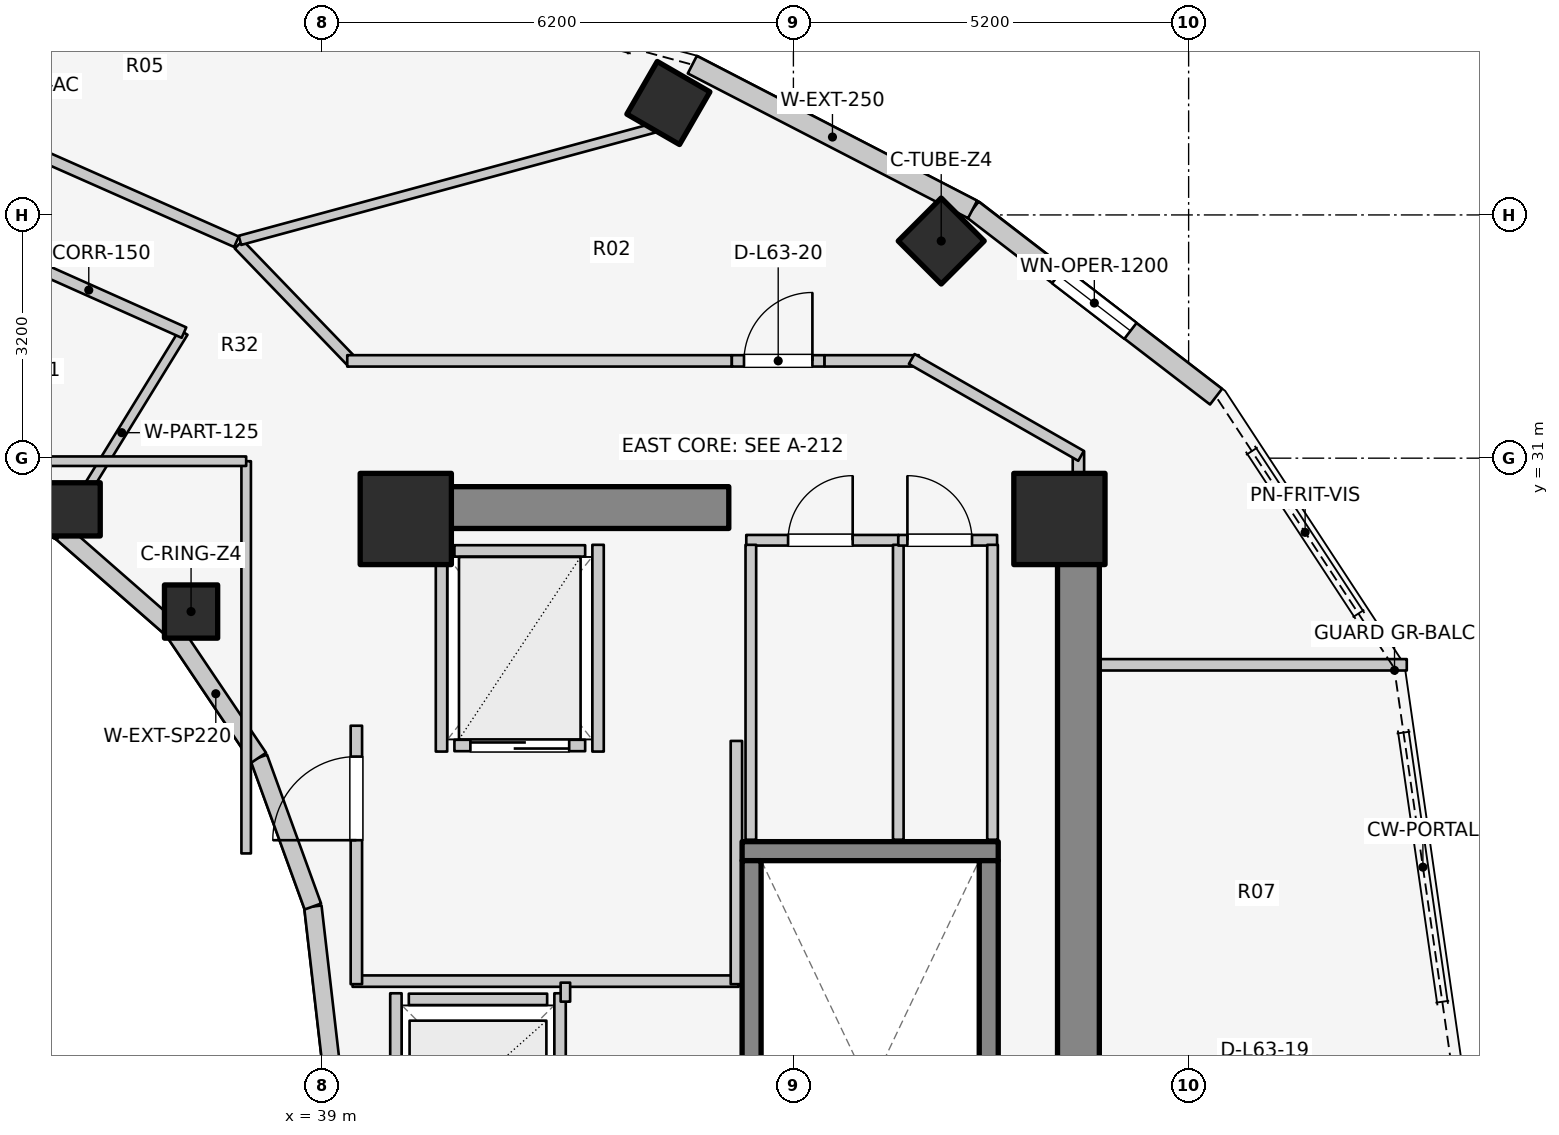
"""IFC4 building model, lengths in metres.
Left out: names, types, materials, properties, quantities, classifications, styles, units other than length and angle.
Written with IfcOpenShell. Run it as: python <this file> out.ifc"""

import sys

from ifc_helpers import new_model, si_unit, direction, frame, frame_2d, origin, origin_2d, place, context, subcontext, project, spatial, rectangle, extrude, element, fill, save


model = new_model("IFC4")
c1 = context("Model", 3, precision=1e-05, world=origin(), true_north=direction((0.0, 1.0)))
c2 = subcontext(c1, "Body", "Model", "MODEL_VIEW")
j1 = project(units=[si_unit("LENGTHUNIT", "METRE"), si_unit("PLANEANGLEUNIT", "RADIAN")], contexts=[c1])
p1 = place(None, origin())
s1 = spatial("IfcSite", under=j1, at=p1, CompositionType="ELEMENT")
p2 = place(p1, origin())
s2 = spatial("IfcBuilding", under=s1, at=p2, CompositionType="ELEMENT")
p3 = place(p2, frame((0.0, 0.0, 207.8)))
s3 = spatial("IfcBuildingStorey", under=s2, at=p3, CompositionType="ELEMENT", Elevation=207.8)
p4 = place(p3, frame((48.95, 17.05, 0.0), z_axis=(0.0, 0.0, 1.0), x_axis=(0.0, 1.0, 0.0)))
e1 = element("IfcWall", 1, at=p4, inside=s3, PredefinedType="SHEAR", context=c2, shape_type="SweptSolid", body=[
    extrude(rectangle(XDim=12.8, YDim=0.55, at=frame_2d((6.4, 0.0))), origin(), (0.0, 0.0, 1.0), 3.1),
])
p5 = place(p3, frame((39.85, 30.35, 0.0), z_axis=(0.0, 0.0, 1.0), x_axis=(1.0, 0.0, 0.0)))
e2 = element("IfcWall", 2, at=p5, inside=s3, PredefinedType="SHEAR", context=c2, shape_type="SweptSolid", body=[
    extrude(rectangle(XDim=4.5, YDim=0.55, at=frame_2d((2.25, 0.0))), origin(), (0.0, 0.0, 1.0), 3.1),
])
p6 = place(p3, frame((44.525, 25.83, 0.0), z_axis=(0.0, 0.0, 1.0), x_axis=(1.0, 0.0, 0.0)))
e3 = element("IfcWall", 3, at=p6, inside=s3, PredefinedType="SOLIDWALL", context=c2, shape_type="SweptSolid", body=[
    extrude(rectangle(XDim=3.37, YDim=0.25, at=frame_2d((1.685, 0.0))), origin(), (0.0, 0.0, 1.0), 3.1),
])
for number, where, z_axis, x_axis in (
    (4, (44.65, 17.895, 0.0), (0.0, 0.0, 1.0), (0.0, 1.0, 0.0)),
    (5, (47.77, 17.895, 0.0), (0.0, 0.0, 1.0), (0.0, 1.0, 0.0)),
):
    element("IfcWall", number, at=place(p3, frame(where, z_axis=z_axis, x_axis=x_axis)), inside=s3, PredefinedType="SOLIDWALL", context=c2, shape_type="SweptSolid", body=[
        extrude(rectangle(XDim=7.81, YDim=0.25, at=frame_2d((3.905, 0.0))), origin(), (0.0, 0.0, 1.0), 3.1),
    ])
for number, where, z_axis, x_axis in (
    (6, (48.7, 30.2, 0.0), (0.0, 0.0, 1.0), (1.0, 0.0, 0.0)),
    (7, (40.1, 30.2, 0.0), (0.0, 0.0, 1.0), (1.0, 0.0, 0.0)),
):
    element("IfcColumn", number, at=place(p3, frame(where, z_axis=z_axis, x_axis=x_axis)), inside=s3, PredefinedType="COLUMN", context=c2, shape_type="SweptSolid", body=[
        extrude(rectangle(XDim=1.2, YDim=1.2, at=origin_2d()), origin(), (0.0, 0.0, 1.0), 3.1),
    ])
p7 = place(p3, frame((37.275, 28.982, 0.0), z_axis=(0.0, 0.0, 1.0), x_axis=(1.0, 0.0, 0.0)))
e8 = element("IfcColumn", 8, at=p7, inside=s3, PredefinedType="COLUMN", context=c2, shape_type="SweptSolid", body=[
    extrude(rectangle(XDim=0.7, YDim=0.7, at=origin_2d()), origin(), (0.0, 0.0, 1.0), 3.1),
])
p8 = place(p3, frame((47.145, 33.857, 0.0), z_axis=(0.0, 0.0, 1.0), x_axis=(0.707106781187, 0.707106781187, 0.0)))
e9 = element("IfcColumn", 9, at=p8, inside=s3, PredefinedType="COLUMN", context=c2, shape_type="SweptSolid", body=[
    extrude(rectangle(XDim=0.8, YDim=0.8, at=origin_2d()), origin(), (0.0, 0.0, 1.0), 3.1),
])
p9 = place(p3, frame((35.73, 30.327, 0.0), z_axis=(0.0, 0.0, 1.0), x_axis=(1.0, 0.0, 0.0)))
e10 = element("IfcColumn", 10, at=p9, inside=s3, PredefinedType="COLUMN", context=c2, shape_type="SweptSolid", body=[
    extrude(rectangle(XDim=0.7, YDim=0.7, at=origin_2d()), origin(), (0.0, 0.0, 1.0), 3.1),
])
p10 = place(p3, frame((43.555, 35.673, 0.0), z_axis=(0.0, 0.0, 1.0), x_axis=(0.5, 0.866025403784, 0.0)))
e11 = element("IfcColumn", 11, at=p10, inside=s3, PredefinedType="COLUMN", context=c2, shape_type="SweptSolid", body=[
    extrude(rectangle(XDim=0.8, YDim=0.8, at=origin_2d()), origin(), (0.0, 0.0, 1.0), 3.1),
])
p11 = place(p3, frame((39.12, 23.0, 0.0), z_axis=(0.0, 0.0, 1.0), x_axis=(-0.114711713601, 0.993398823617, 0.0)))
e12 = element("IfcWall", 12, at=p11, inside=s3, PredefinedType="STANDARD", context=c2, shape_type="SweptSolid", body=[
    extrude(rectangle(XDim=2.115, YDim=0.23, at=frame_2d((1.058, 0.0))), origin(), (0.0, 0.0, 1.0), 2.56),
])
p12 = place(p3, frame((38.877, 25.102, 0.0), z_axis=(0.0, 0.0, 1.0), x_axis=(-0.341423187295, 0.93990968033, 0.0)))
e13 = element("IfcWall", 13, at=p12, inside=s3, PredefinedType="STANDARD", context=c2, shape_type="SweptSolid", body=[
    extrude(rectangle(XDim=2.084, YDim=0.23, at=frame_2d((1.042, 0.0))), origin(), (0.0, 0.0, 1.0), 2.56),
])
p13 = place(p3, frame((38.166, 27.06, 0.0), z_axis=(0.0, 0.0, 1.0), x_axis=(-0.558197800898, 0.829707909492, 0.0)))
e14 = element("IfcWall", 14, at=p13, inside=s3, PredefinedType="STANDARD", context=c2, shape_type="SweptSolid", body=[
    extrude(rectangle(XDim=2.027, YDim=0.23, at=frame_2d((1.013, 0.0))), origin(), (0.0, 0.0, 1.0), 1.22),
])
p14 = place(p3, frame((37.035, 28.742, 0.0), z_axis=(0.0, 0.0, 1.0), x_axis=(-0.752576694707, 0.658504607869, 0.0)))
e15 = element("IfcWall", 15, at=p14, inside=s3, PredefinedType="STANDARD", context=c2, shape_type="SweptSolid", body=[
    extrude(rectangle(XDim=1.959, YDim=0.23, at=frame_2d((0.98, 0.0))), origin(), (0.0, 0.0, 1.0), 1.22),
])
p15 = place(p3, frame((35.56, 30.032, 0.0), z_axis=(0.0, 0.0, 1.0), x_axis=(-0.904179699603, 0.427152280606, 0.0)))
e16 = element("IfcWall", 16, at=p15, inside=s3, PredefinedType="STANDARD", context=c2, shape_type="SweptSolid", body=[
    extrude(rectangle(XDim=1.899, YDim=0.23, at=frame_2d((0.95, 0.0))), origin(), (0.0, 0.0, 1.0), 1.22),
])
p16 = place(p3, frame((50.761, 31.809, 0.0), z_axis=(0.0, 0.0, 1.0), x_axis=(-0.792713817907, 0.609593965603, 0.0)))
e17 = element("IfcWall", 17, at=p16, inside=s3, PredefinedType="STANDARD", context=c2, shape_type="SweptSolid", body=[
    extrude(rectangle(XDim=4.041, YDim=0.26, at=frame_2d((2.021, 0.0))), origin(), (0.0, 0.0, 1.0), 1.22),
])
p17 = place(p16, frame((1.42, 0.0, 0.15)))
e18 = element("IfcOpeningElement", 18, at=p17, cuts=e17, PredefinedType="OPENING", context=c2, shape_type="SweptSolid", body=[
    extrude(rectangle(XDim=1.2, YDim=0.9, at=frame_2d((0.6, 0.45))), frame((0.0, 0.14, 0.0), z_axis=(0.0, -1.0, 0.0), x_axis=(1.0, 0.0, 0.0)), (0.0, 0.0, 1.0), 0.28),
])
p18 = place(p3, frame((47.558, 34.272, 0.0), z_axis=(0.0, 0.0, 1.0), x_axis=(-0.88849146803, 0.458893137057, 0.0)))
e19 = element("IfcWall", 19, at=p18, inside=s3, PredefinedType="STANDARD", context=c2, shape_type="SweptSolid", body=[
    extrude(rectangle(XDim=4.15, YDim=0.26, at=frame_2d((2.075, 0.0))), origin(), (0.0, 0.0, 1.0), 1.22),
])
p19 = place(p3, frame((40.14, 23.88, 0.0), z_axis=(0.0, 0.0, 1.0), x_axis=(1.0, 0.0, 0.0)))
e20 = element("IfcWall", 20, at=p19, inside=s3, PredefinedType="SOLIDWALL", context=c2, shape_type="SweptSolid", body=[
    extrude(rectangle(XDim=1.82, YDim=0.15, at=frame_2d((0.91, 0.0))), origin(), (0.0, 0.0, 1.0), 2.12),
])
p20 = place(p3, frame((39.97, 21.64, 0.0), z_axis=(0.0, 0.0, 1.0), x_axis=(0.0, 1.0, 0.0)))
e21 = element("IfcWall", 21, at=p20, inside=s3, PredefinedType="SOLIDWALL", context=c2, shape_type="SweptSolid", body=[
    extrude(rectangle(XDim=2.32, YDim=0.15, at=frame_2d((1.16, 0.0))), origin(), (0.0, 0.0, 1.0), 2.12),
])
p21 = place(p3, frame((42.13, 21.64, 0.0), z_axis=(0.0, 0.0, 1.0), x_axis=(0.0, 1.0, 0.0)))
e22 = element("IfcWall", 22, at=p21, inside=s3, PredefinedType="SOLIDWALL", context=c2, shape_type="SweptSolid", body=[
    extrude(rectangle(XDim=2.32, YDim=0.15, at=frame_2d((1.16, 0.0))), origin(), (0.0, 0.0, 1.0), 2.575),
])
p22 = place(p3, frame((40.74, 27.22, 0.0), z_axis=(0.0, 0.0, 1.0), x_axis=(1.0, 0.0, 0.0)))
e23 = element("IfcWall", 23, at=p22, inside=s3, PredefinedType="SOLIDWALL", context=c2, shape_type="SweptSolid", body=[
    extrude(rectangle(XDim=1.72, YDim=0.15, at=frame_2d((0.86, 0.0))), origin(), (0.0, 0.0, 1.0), 2.575),
])
p23 = place(p22, frame((0.21, 0.0, 0.0)))
e24 = element("IfcOpeningElement", 24, at=p23, cuts=e23, PredefinedType="OPENING", context=c2, shape_type="SweptSolid", body=[
    extrude(rectangle(XDim=1.3, YDim=2.1, at=frame_2d((0.65, 1.05))), frame((0.0, 0.085, 0.0), z_axis=(0.0, -1.0, 0.0), x_axis=(1.0, 0.0, 0.0)), (0.0, 0.0, 1.0), 0.17),
])
p24 = place(p3, frame((40.74, 29.78, 0.0), z_axis=(0.0, 0.0, 1.0), x_axis=(1.0, 0.0, 0.0)))
e25 = element("IfcWall", 25, at=p24, inside=s3, PredefinedType="SOLIDWALL", context=c2, shape_type="SweptSolid", body=[
    extrude(rectangle(XDim=1.72, YDim=0.15, at=frame_2d((0.86, 0.0))), origin(), (0.0, 0.0, 1.0), 2.575),
])
for number, where, z_axis, x_axis in (
    (26, (40.57, 27.14, 0.0), (0.0, 0.0, 1.0), (0.0, 1.0, 0.0)),
    (27, (42.63, 27.14, 0.0), (0.0, 0.0, 1.0), (0.0, 1.0, 0.0)),
):
    element("IfcWall", number, at=place(p3, frame(where, z_axis=z_axis, x_axis=x_axis)), inside=s3, PredefinedType="SOLIDWALL", context=c2, shape_type="SweptSolid", body=[
        extrude(rectangle(XDim=2.72, YDim=0.15, at=frame_2d((1.36, 0.0))), origin(), (0.0, 0.0, 1.0), 2.575),
    ])
p25 = place(p3, frame((39.4, 24.12, 0.0), z_axis=(0.0, 0.0, 1.0), x_axis=(1.0, 0.0, 0.0)))
e28 = element("IfcWall", 28, at=p25, inside=s3, PredefinedType="PARTITIONING", context=c2, shape_type="SweptSolid", body=[
    extrude(rectangle(XDim=5.08, YDim=0.15, at=frame_2d((2.54, 0.0))), origin(), (0.0, 0.0, 1.0), 2.12),
])
p26 = place(p3, frame((44.45, 24.08, 0.0), z_axis=(0.0, 0.0, 1.0), x_axis=(0.0, 1.0, 0.0)))
e29 = element("IfcWall", 29, at=p26, inside=s3, PredefinedType="PARTITIONING", context=c2, shape_type="SweptSolid", body=[
    extrude(rectangle(XDim=3.2, YDim=0.15, at=frame_2d((1.6, 0.0))), origin(), (0.0, 0.0, 1.0), 2.575),
])
p27 = place(p3, frame((39.45, 24.08, 0.0), z_axis=(0.0, 0.0, 1.0), x_axis=(0.0, 1.0, 0.0)))
e30 = element("IfcWall", 30, at=p27, inside=s3, PredefinedType="PARTITIONING", context=c2, shape_type="SweptSolid", body=[
    extrude(rectangle(XDim=3.4, YDim=0.15, at=frame_2d((1.7, 0.0))), origin(), (0.0, 0.0, 1.0), 2.575),
])
p28 = place(p27, frame((1.894, 0.0, 0.0)))
e31 = element("IfcOpeningElement", 31, at=p28, cuts=e30, PredefinedType="OPENING", context=c2, shape_type="SweptSolid", body=[
    extrude(rectangle(XDim=1.1, YDim=2.1, at=frame_2d((0.55, 1.05))), frame((0.0, 0.085, 0.0), z_axis=(0.0, -1.0, 0.0), x_axis=(1.0, 0.0, 0.0)), (0.0, 0.0, 1.0), 0.17),
])
p29 = place(p3, frame((42.2, 23.85, 0.0), z_axis=(0.0, 0.0, 1.0), x_axis=(0.0, 1.0, 0.0)))
e32 = element("IfcWall", 32, at=p29, inside=s3, PredefinedType="PARTITIONING", context=c2, shape_type="SweptSolid", body=[
    extrude(rectangle(XDim=0.25, YDim=0.125, at=frame_2d((0.125, 0.0))), origin(), (0.0, 0.0, 1.0), 2.575),
])
p30 = place(p3, frame((44.58, 29.92, 0.0), z_axis=(0.0, 0.0, 1.0), x_axis=(1.0, 0.0, 0.0)))
e33 = element("IfcWall", 33, at=p30, inside=s3, PredefinedType="PLUMBINGWALL", context=c2, shape_type="SweptSolid", body=[
    extrude(rectangle(XDim=2.0, YDim=0.14, at=frame_2d((1.0, 0.0))), origin(), (0.0, 0.0, 1.0), 2.575),
])
p31 = place(p30, frame((0.55, 0.0, 0.0)))
e34 = element("IfcOpeningElement", 34, at=p31, cuts=e33, PredefinedType="OPENING", context=c2, shape_type="SweptSolid", body=[
    extrude(rectangle(XDim=0.85, YDim=2.05, at=frame_2d((0.425, 1.025))), frame((0.0, 0.08, 0.0), z_axis=(0.0, -1.0, 0.0), x_axis=(1.0, 0.0, 0.0)), (0.0, 0.0, 1.0), 0.16),
])
for number, where, z_axis, x_axis in (
    (35, (44.64, 25.98, 0.0), (0.0, 0.0, 1.0), (0.0, 1.0, 0.0)),
    (36, (46.58, 25.98, 0.0), (0.0, 0.0, 1.0), (0.0, 1.0, 0.0)),
):
    element("IfcWall", number, at=place(p3, frame(where, z_axis=z_axis, x_axis=x_axis)), inside=s3, PredefinedType="PLUMBINGWALL", context=c2, shape_type="SweptSolid", body=[
        extrude(rectangle(XDim=3.88, YDim=0.14, at=frame_2d((1.94, 0.0))), origin(), (0.0, 0.0, 1.0), 2.575),
    ])
p32 = place(p3, frame((46.58, 29.92, 0.0), z_axis=(0.0, 0.0, 1.0), x_axis=(1.0, 0.0, 0.0)))
e37 = element("IfcWall", 37, at=p32, inside=s3, PredefinedType="PLUMBINGWALL", context=c2, shape_type="SweptSolid", body=[
    extrude(rectangle(XDim=1.3, YDim=0.14, at=frame_2d((0.65, 0.0))), origin(), (0.0, 0.0, 1.0), 2.575),
])
p33 = place(p32, frame((0.12, 0.0, 0.0)))
e38 = element("IfcOpeningElement", 38, at=p33, cuts=e37, PredefinedType="OPENING", context=c2, shape_type="SweptSolid", body=[
    extrude(rectangle(XDim=0.85, YDim=2.05, at=frame_2d((0.425, 1.025))), frame((0.0, 0.08, 0.0), z_axis=(0.0, -1.0, 0.0), x_axis=(1.0, 0.0, 0.0)), (0.0, 0.0, 1.0), 0.16),
])
p34 = place(p3, frame((47.82, 25.98, 0.0), z_axis=(0.0, 0.0, 1.0), x_axis=(0.0, 1.0, 0.0)))
e39 = element("IfcWall", 39, at=p34, inside=s3, PredefinedType="PLUMBINGWALL", context=c2, shape_type="SweptSolid", body=[
    extrude(rectangle(XDim=3.88, YDim=0.14, at=frame_2d((1.94, 0.0))), origin(), (0.0, 0.0, 1.0), 2.575),
])
p35 = place(p3, frame((35.55, 30.015, 0.0), z_axis=(0.0, 0.0, 1.0), x_axis=(0.523992004803, 0.851723182086, 0.0)))
e40 = element("IfcWall", 40, at=p35, inside=s3, PredefinedType="PARTITIONING", context=c2, shape_type="SweptSolid", body=[
    extrude(rectangle(XDim=3.101, YDim=0.125, at=frame_2d((1.551, 0.0))), origin(), (0.0, 0.0, 1.0), 2.096),
])
p36 = place(p3, frame((37.181, 32.652, 0.0), z_axis=(0.0, 0.0, 1.0), x_axis=(-0.913120130558, 0.407690602257, 0.0)))
e41 = element("IfcWall", 41, at=p36, inside=s3, PredefinedType="PARTITIONING", context=c2, shape_type="SweptSolid", body=[
    extrude(rectangle(XDim=2.743, YDim=0.15, at=frame_2d((1.371, 0.0))), origin(), (0.0, 0.0, 1.0), 2.096),
])
p37 = place(p3, frame((38.0, 25.8, 0.0), z_axis=(0.0, 0.0, 1.0), x_axis=(0.0, 1.0, 0.0)))
e42 = element("IfcWall", 42, at=p37, inside=s3, PredefinedType="PARTITIONING", context=c2, shape_type="SweptSolid", body=[
    extrude(rectangle(XDim=5.16, YDim=0.125, at=frame_2d((2.58, 0.0))), origin(), (0.0, 0.0, 1.0), 1.952),
])
p38 = place(p3, frame((35.4, 30.96, 0.0), z_axis=(0.0, 0.0, 1.0), x_axis=(1.0, 0.0, 0.0)))
e43 = element("IfcWall", 43, at=p38, inside=s3, PredefinedType="PARTITIONING", context=c2, shape_type="SweptSolid", body=[
    extrude(rectangle(XDim=2.6, YDim=0.125, at=frame_2d((1.3, 0.0))), origin(), (0.0, 0.0, 1.0), 2.096),
])
p39 = place(p3, frame((48.95, 28.281, 0.0), z_axis=(0.0, 0.0, 1.0), x_axis=(1.0, 0.0, 0.0)))
e44 = element("IfcWall", 44, at=p39, inside=s3, PredefinedType="PARTITIONING", context=c2, shape_type="SweptSolid", body=[
    extrude(rectangle(XDim=4.32, YDim=0.15, at=frame_2d((2.16, 0.0))), origin(), (0.0, 0.0, 1.0), 2.575),
])
p40 = place(p3, frame((48.95, 29.8, 0.0), z_axis=(0.0, 0.0, 1.0), x_axis=(0.0, 1.0, 0.0)))
e45 = element("IfcWall", 45, at=p40, inside=s3, PredefinedType="PARTITIONING", context=c2, shape_type="SweptSolid", body=[
    extrude(rectangle(XDim=1.29, YDim=0.15, at=frame_2d((0.645, 0.0))), origin(), (0.0, 0.0, 1.0), 1.22),
])
p41 = place(p3, frame((37.903, 33.812, 0.0), z_axis=(0.0, 0.0, 1.0), x_axis=(0.694032962553, -0.719943224768, 0.0)))
e46 = element("IfcWall", 46, at=p41, inside=s3, PredefinedType="PARTITIONING", context=c2, shape_type="SweptSolid", body=[
    extrude(rectangle(XDim=2.158, YDim=0.15, at=frame_2d((1.079, 0.0))), origin(), (0.0, 0.0, 1.0), 2.096),
])
p42 = place(p3, frame((39.33, 32.28, 0.0), z_axis=(0.0, 0.0, 1.0), x_axis=(1.0, 0.0, 0.0)))
e47 = element("IfcWall", 47, at=p42, inside=s3, PredefinedType="PARTITIONING", context=c2, shape_type="SweptSolid", body=[
    extrude(rectangle(XDim=5.06, YDim=0.15, at=frame_2d((2.53, 0.0))), origin(), (0.0, 0.0, 1.0), 2.096),
])
p43 = place(p3, frame((44.39, 32.28, 0.0), z_axis=(0.0, 0.0, 1.0), x_axis=(1.0, 0.0, 0.0)))
e48 = element("IfcWall", 48, at=p43, inside=s3, PredefinedType="PARTITIONING", context=c2, shape_type="SweptSolid", body=[
    extrude(rectangle(XDim=1.22, YDim=0.15, at=frame_2d((0.61, 0.0))), origin(), (0.0, 0.0, 1.0), 2.16),
])
p44 = place(p43, frame((0.16, 0.0, 0.0)))
e49 = element("IfcOpeningElement", 49, at=p44, cuts=e48, PredefinedType="OPENING", context=c2, shape_type="SweptSolid", body=[
    extrude(rectangle(XDim=0.9, YDim=2.1, at=frame_2d((0.45, 1.05))), frame((0.0, 0.085, 0.0), z_axis=(0.0, -1.0, 0.0), x_axis=(1.0, 0.0, 0.0)), (0.0, 0.0, 1.0), 0.17),
])
p45 = place(p3, frame((45.61, 32.28, 0.0), z_axis=(0.0, 0.0, 1.0), x_axis=(1.0, 0.0, 0.0)))
e50 = element("IfcWall", 50, at=p45, inside=s3, PredefinedType="PARTITIONING", context=c2, shape_type="SweptSolid", body=[
    extrude(rectangle(XDim=1.24, YDim=0.15, at=frame_2d((0.62, 0.0))), origin(), (0.0, 0.0, 1.0), 2.575),
])
p46 = place(p3, frame((46.757, 32.305, 0.0), z_axis=(0.0, 0.0, 1.0), x_axis=(0.867991349648, -0.496579315857, 0.0)))
e51 = element("IfcWall", 51, at=p46, inside=s3, PredefinedType="PARTITIONING", context=c2, shape_type="SweptSolid", body=[
    extrude(rectangle(XDim=2.567, YDim=0.15, at=frame_2d((1.283, 0.0))), origin(), (0.0, 0.0, 1.0), 1.22),
])
p47 = place(p3, frame((37.918, 33.866, 0.0), z_axis=(0.0, 0.0, 1.0), x_axis=(0.965109390289, 0.261847025523, 0.0)))
e52 = element("IfcWall", 52, at=p47, inside=s3, PredefinedType="PARTITIONING", context=c2, shape_type="SweptSolid", body=[
    extrude(rectangle(XDim=5.644, YDim=0.125, at=frame_2d((2.822, 0.0))), origin(), (0.0, 0.0, 1.0), 1.22),
])
p48 = place(p3, frame((37.872, 33.847, 0.0), z_axis=(0.0, 0.0, 1.0), x_axis=(-0.914490094652, 0.40460828808, 0.0)))
e53 = element("IfcWall", 53, at=p48, inside=s3, PredefinedType="PARTITIONING", context=c2, shape_type="SweptSolid", body=[
    extrude(rectangle(XDim=3.11, YDim=0.15, at=frame_2d((1.555, 0.0))), origin(), (0.0, 0.0, 1.0), 2.096),
])
p49 = place(p17, origin())
e54 = element("IfcWindow", 54, at=p49, inside=s3, PartitioningType="SINGLE_PANEL", PredefinedType="WINDOW", context=c2, shape_type="SweptSolid", body=[
    extrude(rectangle(XDim=1.2, YDim=0.9, at=frame_2d((0.6, 0.45))), frame((0.0, 0.03, 0.0), z_axis=(0.0, -1.0, 0.0), x_axis=(1.0, 0.0, 0.0)), (0.0, 0.0, 1.0), 0.06),
])
fill(e18, e54)
p50 = place(p23, origin())
e55 = element("IfcDoor", 55, at=p50, inside=s3, OperationType="DOUBLE_DOOR_SLIDING", PredefinedType="DOOR", context=c2, shape_type="SweptSolid", body=[
    extrude(rectangle(XDim=1.3, YDim=2.1, at=frame_2d((0.65, 1.05))), frame((0.0, 0.025, 0.0), z_axis=(0.0, -1.0, 0.0), x_axis=(1.0, 0.0, 0.0)), (0.0, 0.0, 1.0), 0.05),
])
fill(e24, e55)
p51 = place(p28, origin())
e56 = element("IfcDoor", 56, at=p51, inside=s3, OperationType="SINGLE_SWING_LEFT", PredefinedType="DOOR", context=c2, shape_type="SweptSolid", body=[
    extrude(rectangle(XDim=1.1, YDim=2.1, at=frame_2d((0.55, 1.05))), frame((0.0, 0.025, 0.0), z_axis=(0.0, -1.0, 0.0), x_axis=(1.0, 0.0, 0.0)), (0.0, 0.0, 1.0), 0.05),
])
fill(e31, e56)
p52 = place(p31, origin())
e57 = element("IfcDoor", 57, at=p52, inside=s3, OperationType="SINGLE_SWING_RIGHT", PredefinedType="DOOR", context=c2, shape_type="SweptSolid", body=[
    extrude(rectangle(XDim=0.85, YDim=2.05, at=frame_2d((0.425, 1.025))), frame((0.0, 0.025, 0.0), z_axis=(0.0, -1.0, 0.0), x_axis=(1.0, 0.0, 0.0)), (0.0, 0.0, 1.0), 0.05),
])
fill(e34, e57)
p53 = place(p33, origin())
e58 = element("IfcDoor", 58, at=p53, inside=s3, OperationType="SINGLE_SWING_LEFT", PredefinedType="DOOR", context=c2, shape_type="SweptSolid", body=[
    extrude(rectangle(XDim=0.85, YDim=2.05, at=frame_2d((0.425, 1.025))), frame((0.0, 0.025, 0.0), z_axis=(0.0, -1.0, 0.0), x_axis=(1.0, 0.0, 0.0)), (0.0, 0.0, 1.0), 0.05),
])
fill(e38, e58)
p54 = place(p44, origin())
e59 = element("IfcDoor", 59, at=p54, inside=s3, OperationType="SINGLE_SWING_RIGHT", PredefinedType="DOOR", context=c2, shape_type="SweptSolid", body=[
    extrude(rectangle(XDim=0.9, YDim=2.1, at=frame_2d((0.45, 1.05))), frame((0.0, 0.025, 0.0), z_axis=(0.0, -1.0, 0.0), x_axis=(1.0, 0.0, 0.0)), (0.0, 0.0, 1.0), 0.05),
])
fill(e49, e59)
save(model, sys.argv[1])
